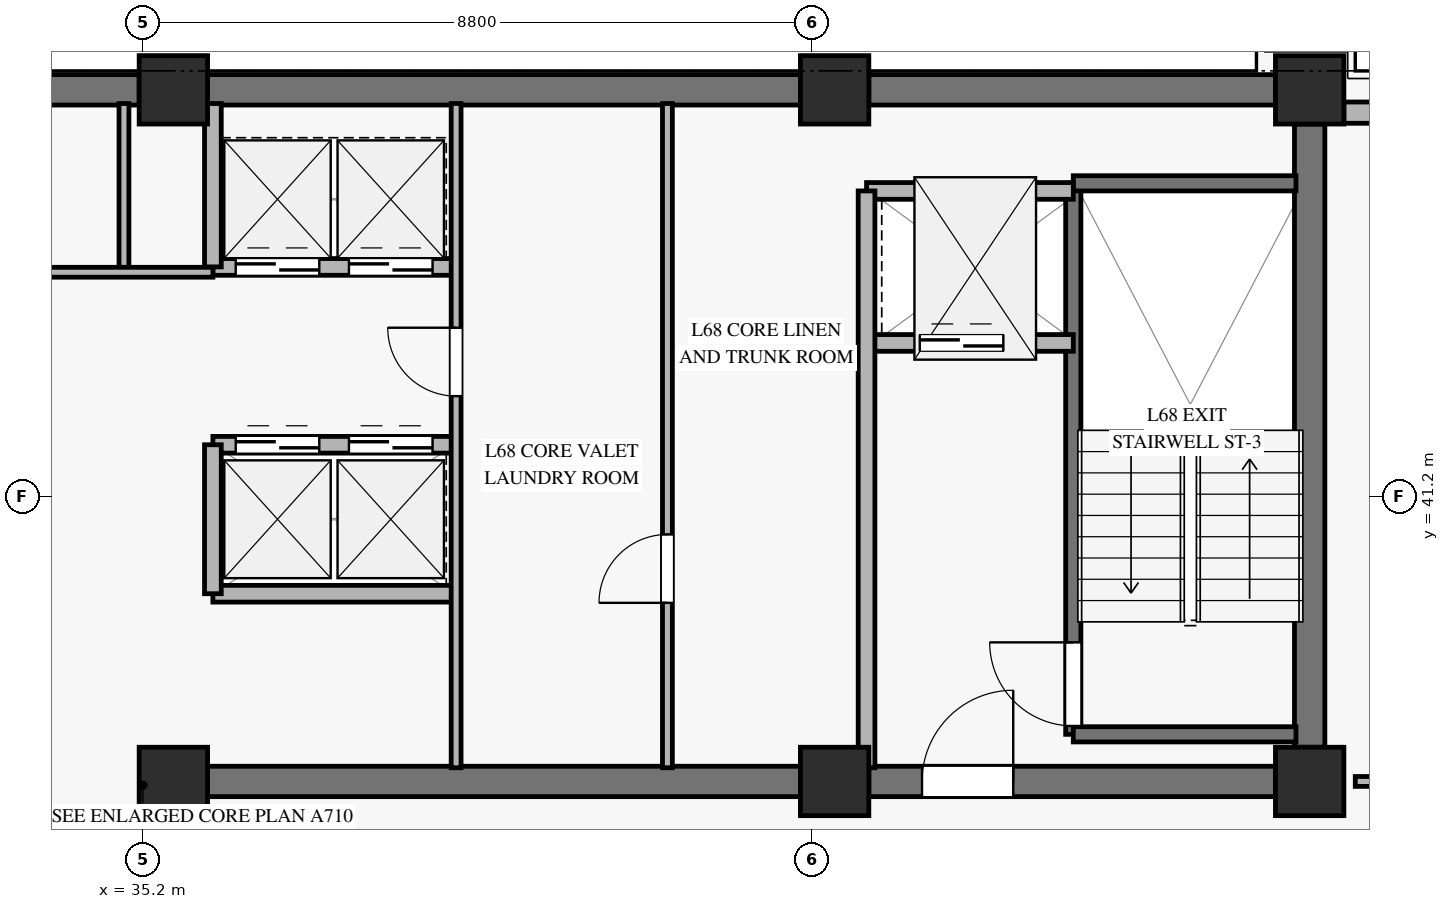
"""IFC4 building model, lengths in metres.
Left out: names, types, materials, properties, quantities, classifications, styles, units other than length and angle.
Written with IfcOpenShell. Run it as: python <this file> out.ifc"""

import sys

from ifc_helpers import new_model, si_unit, direction, frame, frame_2d, origin, origin_2d, place, context, subcontext, project, spatial, rectangle, extrude, source, transform, mapped, element, fill, save


model = new_model("IFC4")
c1 = context("Model", 3, precision=1e-05, world=origin(), true_north=direction((0.0, 1.0)))
c2 = subcontext(c1, "Body", "Model", "MODEL_VIEW")
j1 = project(units=[si_unit("LENGTHUNIT", "METRE"), si_unit("PLANEANGLEUNIT", "RADIAN")], contexts=[c1])
p1 = place(None, origin())
s1 = spatial("IfcSite", under=j1, at=p1, CompositionType="ELEMENT")
p2 = place(p1, origin())
s2 = spatial("IfcBuilding", under=s1, at=p2, CompositionType="ELEMENT")
p3 = place(p2, frame((0.0, 0.0, 265.5)))
s3 = spatial("IfcBuildingStorey", under=s2, at=p3, CompositionType="ELEMENT", Elevation=265.5)
m1 = source(origin(), c2, "Body", "SweptSolid", [
    extrude(rectangle(XDim=0.9, YDim=0.9, at=origin_2d()), origin(), (0.0, 0.0, 1.0), 3.185),
])
for number, where, z_axis, x_axis in (
    (1, (35.6, 37.45, 0.0), (0.0, 0.0, 1.0), (1.0, 0.0, 0.0)),
    (2, (35.6, 46.55, 0.0), (0.0, 0.0, 1.0), (1.0, 0.0, 0.0)),
    (3, (44.3, 37.45, 0.0), (0.0, 0.0, 1.0), (1.0, 0.0, 0.0)),
    (4, (44.3, 46.55, 0.0), (0.0, 0.0, 1.0), (1.0, 0.0, 0.0)),
    (5, (50.55, 37.45, 0.0), (0.0, 0.0, 1.0), (1.0, 0.0, 0.0)),
    (6, (50.55, 46.55, 0.0), (0.0, 0.0, 1.0), (1.0, 0.0, 0.0)),
):
    element("IfcColumn", number, at=place(p3, frame(where, z_axis=z_axis, x_axis=x_axis)), inside=s3, PredefinedType="PILASTER", context=c2, shape_type="MappedRepresentation", body=[
        mapped(m1, transform((0.0, 0.0, 0.0), x_axis=(1.0, 0.0, 0.0), y_axis=(0.0, 1.0, 0.0), z_axis=(0.0, 0.0, 1.0), scale=1.0)),
    ])
p4 = place(p3, frame((31.25, 46.55, 0.0), z_axis=(0.0, 0.0, 1.0), x_axis=(1.0, 0.0, 0.0)))
e7 = element("IfcWall", 7, at=p4, inside=s3, PredefinedType="SHEAR", context=c2, shape_type="SweptSolid", body=[
    extrude(rectangle(XDim=3.9, YDim=0.4, at=frame_2d((1.95, 0.0))), origin(), (0.0, 0.0, 1.0), 3.185),
])
p5 = place(p3, frame((36.05, 46.55, 0.0), z_axis=(0.0, 0.0, 1.0), x_axis=(1.0, 0.0, 0.0)))
e8 = element("IfcWall", 8, at=p5, inside=s3, PredefinedType="SHEAR", context=c2, shape_type="SweptSolid", body=[
    extrude(rectangle(XDim=7.8, YDim=0.4, at=frame_2d((3.9, 0.0))), origin(), (0.0, 0.0, 1.0), 3.185),
])
p6 = place(p3, frame((44.75, 46.55, 0.0), z_axis=(0.0, 0.0, 1.0), x_axis=(1.0, 0.0, 0.0)))
e9 = element("IfcWall", 9, at=p6, inside=s3, PredefinedType="SHEAR", context=c2, shape_type="SweptSolid", body=[
    extrude(rectangle(XDim=5.35, YDim=0.4, at=frame_2d((2.675, 0.0))), origin(), (0.0, 0.0, 1.0), 3.185),
])
p7 = place(p3, frame((36.05, 37.45, 0.0), z_axis=(0.0, 0.0, 1.0), x_axis=(1.0, 0.0, 0.0)))
e10 = element("IfcWall", 10, at=p7, inside=s3, PredefinedType="SHEAR", context=c2, shape_type="SweptSolid", body=[
    extrude(rectangle(XDim=7.8, YDim=0.4, at=frame_2d((3.9, 0.0))), origin(), (0.0, 0.0, 1.0), 3.185),
])
p8 = place(p3, frame((44.75, 37.45, 0.0), z_axis=(0.0, 0.0, 1.0), x_axis=(1.0, 0.0, 0.0)))
e11 = element("IfcWall", 11, at=p8, inside=s3, PredefinedType="SHEAR", context=c2, shape_type="SweptSolid", body=[
    extrude(rectangle(XDim=5.35, YDim=0.4, at=frame_2d((2.675, 0.0))), origin(), (0.0, 0.0, 1.0), 3.185),
])
p9 = place(p8, frame((0.7, 0.0, 0.0)))
e12 = element("IfcOpeningElement", 12, at=p9, cuts=e11, PredefinedType="OPENING", context=c2, shape_type="SweptSolid", body=[
    extrude(rectangle(XDim=1.2, YDim=2.15, at=frame_2d((0.6, 1.075))), frame((0.0, 0.21, 0.0), z_axis=(0.0, -1.0, 0.0), x_axis=(1.0, 0.0, 0.0)), (0.0, 0.0, 1.0), 0.42),
])
p10 = place(p3, frame((50.55, 37.9, 0.0), z_axis=(0.0, 0.0, 1.0), x_axis=(0.0, 1.0, 0.0)))
e13 = element("IfcWall", 13, at=p10, inside=s3, PredefinedType="SHEAR", context=c2, shape_type="SweptSolid", body=[
    extrude(rectangle(XDim=8.2, YDim=0.4, at=frame_2d((4.1, 0.0))), origin(), (0.0, 0.0, 1.0), 3.185),
])
p11 = place(p3, frame((51.0, 46.25, 0.0), z_axis=(0.0, 0.0, 1.0), x_axis=(1.0, 0.0, 0.0)))
e14 = element("IfcWall", 14, at=p11, inside=s3, PredefinedType="SOLIDWALL", context=c2, shape_type="SweptSolid", body=[
    extrude(rectangle(XDim=7.803, YDim=0.28, at=frame_2d((3.901, 0.0))), origin(), (0.0, 0.0, 1.0), 2.815),
])
p12 = place(p11, frame((3.101, 0.0, 0.45)))
e15 = element("IfcOpeningElement", 15, at=p12, cuts=e14, PredefinedType="OPENING", context=c2, shape_type="SweptSolid", body=[
    extrude(rectangle(XDim=1.6, YDim=2.0, at=frame_2d((0.8, 1.0))), frame((0.0, 0.15, 0.0), z_axis=(0.0, -1.0, 0.0), x_axis=(1.0, 0.0, 0.0)), (0.0, 0.0, 1.0), 0.3),
])
p13 = place(p3, frame((47.44, 38.07, 0.0), z_axis=(0.0, 0.0, 1.0), x_axis=(0.0, 1.0, 0.0)))
e16 = element("IfcWall", 16, at=p13, inside=s3, PredefinedType="SOLIDWALL", context=c2, shape_type="SweptSolid", body=[
    extrude(rectangle(XDim=7.25, YDim=0.2, at=frame_2d((3.625, 0.0))), origin(), (0.0, 0.0, 1.0), 3.4),
])
p14 = place(p13, frame((0.11, 0.0, 0.0)))
e17 = element("IfcOpeningElement", 17, at=p14, cuts=e16, PredefinedType="OPENING", context=c2, shape_type="SweptSolid", body=[
    extrude(rectangle(XDim=1.1, YDim=2.15, at=frame_2d((0.55, 1.075))), frame((0.0, 0.11, 0.0), z_axis=(0.0, -1.0, 0.0), x_axis=(1.0, 0.0, 0.0)), (0.0, 0.0, 1.0), 0.22),
])
for number, where, z_axis, x_axis in (
    (18, (47.44, 45.32, 0.0), (0.0, 0.0, 1.0), (1.0, 0.0, 0.0)),
    (19, (47.44, 38.07, 0.0), (0.0, 0.0, 1.0), (1.0, 0.0, 0.0)),
):
    element("IfcWall", number, at=place(p3, frame(where, z_axis=z_axis, x_axis=x_axis)), inside=s3, PredefinedType="SOLIDWALL", context=c2, shape_type="SweptSolid", body=[
        extrude(rectangle(XDim=2.93, YDim=0.2, at=frame_2d((1.465, 0.0))), origin(), (0.0, 0.0, 1.0), 3.4),
    ])
p15 = place(p3, frame((44.72, 43.22, 0.0), z_axis=(0.0, 0.0, 1.0), x_axis=(1.0, 0.0, 0.0)))
e20 = element("IfcWall", 20, at=p15, inside=s3, PredefinedType="SOLIDWALL", context=c2, shape_type="SweptSolid", body=[
    extrude(rectangle(XDim=2.72, YDim=0.22, at=frame_2d((1.36, 0.0))), origin(), (0.0, 0.0, 1.0), 3.185),
])
p16 = place(p15, frame((0.7, 0.0, 0.0)))
e21 = element("IfcOpeningElement", 21, at=p16, cuts=e20, PredefinedType="OPENING", context=c2, shape_type="SweptSolid", body=[
    extrude(rectangle(XDim=1.1, YDim=2.2, at=frame_2d((0.55, 1.1))), frame((0.0, 0.12, 0.0), z_axis=(0.0, -1.0, 0.0), x_axis=(1.0, 0.0, 0.0)), (0.0, 0.0, 1.0), 0.24),
])
p17 = place(p3, frame((44.72, 45.22, 0.0), z_axis=(0.0, 0.0, 1.0), x_axis=(1.0, 0.0, 0.0)))
e22 = element("IfcWall", 22, at=p17, inside=s3, PredefinedType="SOLIDWALL", context=c2, shape_type="SweptSolid", body=[
    extrude(rectangle(XDim=2.72, YDim=0.22, at=frame_2d((1.36, 0.0))), origin(), (0.0, 0.0, 1.0), 3.185),
])
p18 = place(p3, frame((44.72, 37.63, 0.0), z_axis=(0.0, 0.0, 1.0), x_axis=(0.0, 1.0, 0.0)))
e23 = element("IfcWall", 23, at=p18, inside=s3, PredefinedType="SOLIDWALL", context=c2, shape_type="SweptSolid", body=[
    extrude(rectangle(XDim=7.59, YDim=0.22, at=frame_2d((3.795, 0.0))), origin(), (0.0, 0.0, 1.0), 3.185),
])
p19 = place(p3, frame((36.12, 44.22, 0.0), z_axis=(0.0, 0.0, 1.0), x_axis=(1.0, 0.0, 0.0)))
e24 = element("IfcWall", 24, at=p19, inside=s3, PredefinedType="SOLIDWALL", context=c2, shape_type="SweptSolid", body=[
    extrude(rectangle(XDim=3.2, YDim=0.22, at=frame_2d((1.6, 0.0))), origin(), (0.0, 0.0, 1.0), 3.185),
])
p20 = place(p19, frame((0.3, 0.0, 0.0)))
e25 = element("IfcOpeningElement", 25, at=p20, cuts=e24, PredefinedType="OPENING", context=c2, shape_type="SweptSolid", body=[
    extrude(rectangle(XDim=1.1, YDim=2.2, at=frame_2d((0.55, 1.1))), frame((0.0, 0.12, 0.0), z_axis=(0.0, -1.0, 0.0), x_axis=(1.0, 0.0, 0.0)), (0.0, 0.0, 1.0), 0.24),
])
p21 = place(p19, frame((1.79, 0.0, 0.0)))
e26 = element("IfcOpeningElement", 26, at=p21, cuts=e24, PredefinedType="OPENING", context=c2, shape_type="SweptSolid", body=[
    extrude(rectangle(XDim=1.1, YDim=2.2, at=frame_2d((0.55, 1.1))), frame((0.0, 0.12, 0.0), z_axis=(0.0, -1.0, 0.0), x_axis=(1.0, 0.0, 0.0)), (0.0, 0.0, 1.0), 0.24),
])
p22 = place(p3, frame((36.12, 41.88, 0.0), z_axis=(0.0, 0.0, 1.0), x_axis=(1.0, 0.0, 0.0)))
e27 = element("IfcWall", 27, at=p22, inside=s3, PredefinedType="SOLIDWALL", context=c2, shape_type="SweptSolid", body=[
    extrude(rectangle(XDim=3.2, YDim=0.22, at=frame_2d((1.6, 0.0))), origin(), (0.0, 0.0, 1.0), 3.185),
])
p23 = place(p22, frame((0.3, 0.0, 0.0)))
e28 = element("IfcOpeningElement", 28, at=p23, cuts=e27, PredefinedType="OPENING", context=c2, shape_type="SweptSolid", body=[
    extrude(rectangle(XDim=1.1, YDim=2.2, at=frame_2d((0.55, 1.1))), frame((0.0, 0.12, 0.0), z_axis=(0.0, -1.0, 0.0), x_axis=(1.0, 0.0, 0.0)), (0.0, 0.0, 1.0), 0.24),
])
p24 = place(p22, frame((1.79, 0.0, 0.0)))
e29 = element("IfcOpeningElement", 29, at=p24, cuts=e27, PredefinedType="OPENING", context=c2, shape_type="SweptSolid", body=[
    extrude(rectangle(XDim=1.1, YDim=2.2, at=frame_2d((0.55, 1.1))), frame((0.0, 0.12, 0.0), z_axis=(0.0, -1.0, 0.0), x_axis=(1.0, 0.0, 0.0)), (0.0, 0.0, 1.0), 0.24),
])
p25 = place(p3, frame((36.12, 39.92, 0.0), z_axis=(0.0, 0.0, 1.0), x_axis=(1.0, 0.0, 0.0)))
e30 = element("IfcWall", 30, at=p25, inside=s3, PredefinedType="SOLIDWALL", context=c2, shape_type="SweptSolid", body=[
    extrude(rectangle(XDim=3.2, YDim=0.22, at=frame_2d((1.6, 0.0))), origin(), (0.0, 0.0, 1.0), 3.185),
])
p26 = place(p3, frame((36.12, 39.92, 0.0), z_axis=(0.0, 0.0, 1.0), x_axis=(0.0, 1.0, 0.0)))
e31 = element("IfcWall", 31, at=p26, inside=s3, PredefinedType="SOLIDWALL", context=c2, shape_type="SweptSolid", body=[
    extrude(rectangle(XDim=1.96, YDim=0.22, at=frame_2d((0.98, 0.0))), origin(), (0.0, 0.0, 1.0), 3.185),
])
p27 = place(p3, frame((36.12, 44.22, 0.0), z_axis=(0.0, 0.0, 1.0), x_axis=(0.0, 1.0, 0.0)))
e32 = element("IfcWall", 32, at=p27, inside=s3, PredefinedType="SOLIDWALL", context=c2, shape_type="SweptSolid", body=[
    extrude(rectangle(XDim=2.15, YDim=0.22, at=frame_2d((1.075, 0.0))), origin(), (0.0, 0.0, 1.0), 3.185),
])
p28 = place(p3, frame((34.95, 44.15, 0.0), z_axis=(0.0, 0.0, 1.0), x_axis=(0.0, 1.0, 0.0)))
e33 = element("IfcWall", 33, at=p28, inside=s3, PredefinedType="PARTITIONING", context=c2, shape_type="SweptSolid", body=[
    extrude(rectangle(XDim=2.22, YDim=0.13, at=frame_2d((1.11, 0.0))), origin(), (0.0, 0.0, 1.0), 3.185),
])
p29 = place(p3, frame((33.18, 44.15, 0.0), z_axis=(0.0, 0.0, 1.0), x_axis=(1.0, 0.0, 0.0)))
e34 = element("IfcWall", 34, at=p29, inside=s3, PredefinedType="PARTITIONING", context=c2, shape_type="SweptSolid", body=[
    extrude(rectangle(XDim=2.94, YDim=0.13, at=frame_2d((1.47, 0.0))), origin(), (0.0, 0.0, 1.0), 2.47),
])
p30 = place(p3, frame((39.32, 37.63, 0.0), z_axis=(0.0, 0.0, 1.0), x_axis=(0.0, 1.0, 0.0)))
e35 = element("IfcWall", 35, at=p30, inside=s3, PredefinedType="PARTITIONING", context=c2, shape_type="SweptSolid", body=[
    extrude(rectangle(XDim=8.74, YDim=0.13, at=frame_2d((4.37, 0.0))), origin(), (0.0, 0.0, 1.0), 3.185),
])
p31 = place(p30, frame((4.89, 0.0, 0.0)))
e36 = element("IfcOpeningElement", 36, at=p31, cuts=e35, PredefinedType="OPENING", context=c2, shape_type="SweptSolid", body=[
    extrude(rectangle(XDim=0.9, YDim=2.1, at=frame_2d((0.45, 1.05))), frame((0.0, 0.075, 0.0), z_axis=(0.0, -1.0, 0.0), x_axis=(1.0, 0.0, 0.0)), (0.0, 0.0, 1.0), 0.15),
])
p32 = place(p3, frame((42.1, 37.63, 0.0), z_axis=(0.0, 0.0, 1.0), x_axis=(0.0, 1.0, 0.0)))
e37 = element("IfcWall", 37, at=p32, inside=s3, PredefinedType="PARTITIONING", context=c2, shape_type="SweptSolid", body=[
    extrude(rectangle(XDim=8.74, YDim=0.13, at=frame_2d((4.37, 0.0))), origin(), (0.0, 0.0, 1.0), 3.185),
])
p33 = place(p32, frame((2.17, 0.0, 0.0)))
e38 = element("IfcOpeningElement", 38, at=p33, cuts=e37, PredefinedType="OPENING", context=c2, shape_type="SweptSolid", body=[
    extrude(rectangle(XDim=0.9, YDim=2.1, at=frame_2d((0.45, 1.05))), frame((0.0, 0.075, 0.0), z_axis=(0.0, -1.0, 0.0), x_axis=(1.0, 0.0, 0.0)), (0.0, 0.0, 1.0), 0.15),
])
p34 = place(p3, frame((51.15, 37.45, 0.0), z_axis=(0.0, 0.0, 1.0), x_axis=(1.0, 0.0, 0.0)))
e39 = element("IfcWall", 39, at=p34, inside=s3, PredefinedType="PARTITIONING", context=c2, shape_type="SweptSolid", body=[
    extrude(rectangle(XDim=10.472, YDim=0.13, at=frame_2d((5.236, 0.0))), origin(), (0.0, 0.0, 1.0), 2.82),
])
p35 = place(p34, frame((0.5, 0.0, 0.0)))
e40 = element("IfcOpeningElement", 40, at=p35, cuts=e39, PredefinedType="OPENING", context=c2, shape_type="SweptSolid", body=[
    extrude(rectangle(XDim=0.9, YDim=2.1, at=frame_2d((0.45, 1.05))), frame((0.0, 0.075, 0.0), z_axis=(0.0, -1.0, 0.0), x_axis=(1.0, 0.0, 0.0)), (0.0, 0.0, 1.0), 0.15),
])
p36 = place(p34, frame((7.48, 0.0, 0.0)))
e41 = element("IfcOpeningElement", 41, at=p36, cuts=e39, PredefinedType="OPENING", context=c2, shape_type="SweptSolid", body=[
    extrude(rectangle(XDim=0.95, YDim=2.1, at=frame_2d((0.475, 1.05))), frame((0.0, 0.075, 0.0), z_axis=(0.0, -1.0, 0.0), x_axis=(1.0, 0.0, 0.0)), (0.0, 0.0, 1.0), 0.15),
])
m2 = source(origin(), c2, "Body", "SweptSolid", [
    extrude(rectangle(XDim=1.1, YDim=2.15, at=frame_2d((0.55, 1.075))), frame((0.0, 0.025, 0.0), z_axis=(0.0, -1.0, 0.0), x_axis=(1.0, 0.0, 0.0)), (0.0, 0.0, 1.0), 0.05),
])
p37 = place(p14, origin())
e42 = element("IfcDoor", 42, at=p37, inside=s3, OperationType="SINGLE_SWING_RIGHT", PredefinedType="DOOR", context=c2, shape_type="MappedRepresentation", body=[
    mapped(m2, transform((0.0, 0.0, 0.0), x_axis=(1.0, 0.0, 0.0), y_axis=(0.0, 1.0, 0.0), z_axis=(0.0, 0.0, 1.0), scale=1.0)),
])
fill(e17, e42)
m3 = source(origin(), c2, "Body", "SweptSolid", [
    extrude(rectangle(XDim=1.1, YDim=2.2, at=frame_2d((0.55, 1.1))), frame((0.0, 0.025, 0.0), z_axis=(0.0, -1.0, 0.0), x_axis=(1.0, 0.0, 0.0)), (0.0, 0.0, 1.0), 0.05),
])
p38 = place(p16, origin())
e43 = element("IfcDoor", 43, at=p38, inside=s3, OperationType="SLIDING_TO_LEFT", PredefinedType="DOOR", context=c2, shape_type="MappedRepresentation", body=[
    mapped(m3, transform((0.0, 0.0, 0.0), x_axis=(1.0, 0.0, 0.0), y_axis=(0.0, 1.0, 0.0), z_axis=(0.0, 0.0, 1.0), scale=1.0)),
])
fill(e21, e43)
m4 = source(origin(), c2, "Body", "SweptSolid", [
    extrude(rectangle(XDim=1.2, YDim=2.15, at=frame_2d((0.6, 1.075))), frame((0.0, 0.025, 0.0), z_axis=(0.0, -1.0, 0.0), x_axis=(1.0, 0.0, 0.0)), (0.0, 0.0, 1.0), 0.05),
])
p39 = place(p9, origin())
e44 = element("IfcDoor", 44, at=p39, inside=s3, OperationType="SINGLE_SWING_RIGHT", PredefinedType="DOOR", context=c2, shape_type="MappedRepresentation", body=[
    mapped(m4, transform((0.0, 0.0, 0.0), x_axis=(1.0, 0.0, 0.0), y_axis=(0.0, 1.0, 0.0), z_axis=(0.0, 0.0, 1.0), scale=1.0)),
])
fill(e12, e44)
p40 = place(p20, origin())
e45 = element("IfcDoor", 45, at=p40, inside=s3, OperationType="SLIDING_TO_LEFT", PredefinedType="DOOR", context=c2, shape_type="MappedRepresentation", body=[
    mapped(m3, transform((0.0, 0.0, 0.0), x_axis=(1.0, 0.0, 0.0), y_axis=(0.0, 1.0, 0.0), z_axis=(0.0, 0.0, 1.0), scale=1.0)),
])
fill(e25, e45)
p41 = place(p21, origin())
e46 = element("IfcDoor", 46, at=p41, inside=s3, OperationType="SLIDING_TO_LEFT", PredefinedType="DOOR", context=c2, shape_type="MappedRepresentation", body=[
    mapped(m3, transform((0.0, 0.0, 0.0), x_axis=(1.0, 0.0, 0.0), y_axis=(0.0, 1.0, 0.0), z_axis=(0.0, 0.0, 1.0), scale=1.0)),
])
fill(e26, e46)
p42 = place(p23, origin())
e47 = element("IfcDoor", 47, at=p42, inside=s3, OperationType="SLIDING_TO_LEFT", PredefinedType="DOOR", context=c2, shape_type="MappedRepresentation", body=[
    mapped(m3, transform((0.0, 0.0, 0.0), x_axis=(1.0, 0.0, 0.0), y_axis=(0.0, 1.0, 0.0), z_axis=(0.0, 0.0, 1.0), scale=1.0)),
])
fill(e28, e47)
p43 = place(p24, origin())
e48 = element("IfcDoor", 48, at=p43, inside=s3, OperationType="SLIDING_TO_LEFT", PredefinedType="DOOR", context=c2, shape_type="MappedRepresentation", body=[
    mapped(m3, transform((0.0, 0.0, 0.0), x_axis=(1.0, 0.0, 0.0), y_axis=(0.0, 1.0, 0.0), z_axis=(0.0, 0.0, 1.0), scale=1.0)),
])
fill(e29, e48)
m5 = source(origin(), c2, "Body", "SweptSolid", [
    extrude(rectangle(XDim=0.9, YDim=2.1, at=frame_2d((0.45, 1.05))), frame((0.0, 0.025, 0.0), z_axis=(0.0, -1.0, 0.0), x_axis=(1.0, 0.0, 0.0)), (0.0, 0.0, 1.0), 0.05),
])
p44 = place(p31, origin())
e49 = element("IfcDoor", 49, at=p44, inside=s3, OperationType="SINGLE_SWING_RIGHT", PredefinedType="DOOR", context=c2, shape_type="MappedRepresentation", body=[
    mapped(m5, transform((0.0, 0.0, 0.0), x_axis=(1.0, 0.0, 0.0), y_axis=(0.0, 1.0, 0.0), z_axis=(0.0, 0.0, 1.0), scale=1.0)),
])
fill(e36, e49)
p45 = place(p33, origin())
e50 = element("IfcDoor", 50, at=p45, inside=s3, OperationType="SINGLE_SWING_LEFT", PredefinedType="DOOR", context=c2, shape_type="MappedRepresentation", body=[
    mapped(m5, transform((0.0, 0.0, 0.0), x_axis=(1.0, 0.0, 0.0), y_axis=(0.0, 1.0, 0.0), z_axis=(0.0, 0.0, 1.0), scale=1.0)),
])
fill(e38, e50)
save(model, sys.argv[1])
